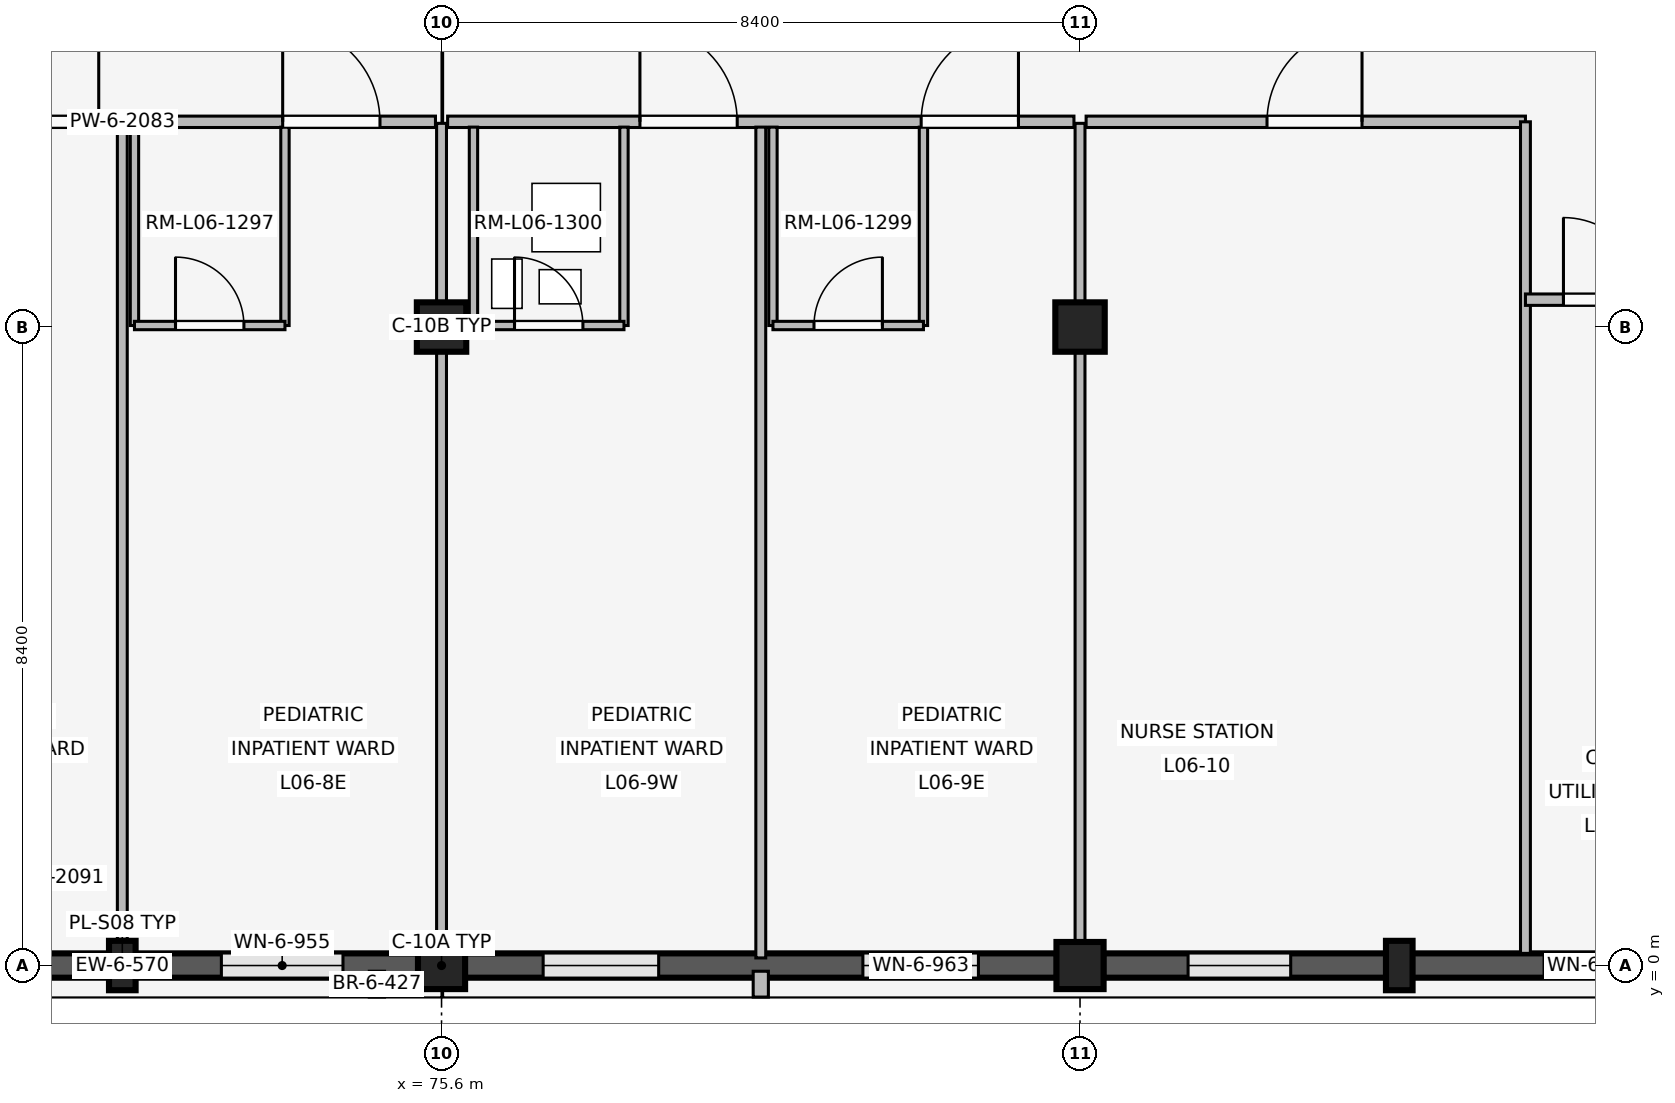
"""IFC4 building model, lengths in metres.
Left out: names, types, materials, properties, quantities, classifications, styles, units other than length and angle.
Written with IfcOpenShell. Run it as: python <this file> out.ifc"""

import sys

from ifc_helpers import new_model, si_unit, direction, frame, frame_2d, origin, origin_2d, place, context, subcontext, project, spatial, rectangle, extrude, element, fill, save


model = new_model("IFC4")
c1 = context("Model", 3, precision=1e-05, world=origin(), true_north=direction((0.0, 1.0)))
c2 = subcontext(c1, "Body", "Model", "MODEL_VIEW")
j1 = project(units=[si_unit("LENGTHUNIT", "METRE"), si_unit("PLANEANGLEUNIT", "RADIAN")], contexts=[c1])
p1 = place(None, origin())
s1 = spatial("IfcSite", under=j1, at=p1, CompositionType="ELEMENT")
p2 = place(p1, origin())
s2 = spatial("IfcBuilding", under=s1, at=p2, CompositionType="ELEMENT")
p3 = place(p2, frame((0.0, 0.0, 24.6)))
s3 = spatial("IfcBuildingStorey", under=s2, at=p3, CompositionType="ELEMENT", Elevation=24.6)
p4 = place(p3, frame((75.6, 0.0, 0.0), z_axis=(0.0, 0.0, 1.0), x_axis=(1.0, 0.0, 0.0)))
e1 = element("IfcColumn", 1, at=p4, inside=s3, PredefinedType="COLUMN", context=c2, shape_type="SweptSolid", body=[
    extrude(rectangle(XDim=0.62, YDim=0.62, at=origin_2d()), origin(), (0.0, 0.0, 1.0), 4.2),
])
p5 = place(p3, frame((75.6, 8.4, 0.0), z_axis=(0.0, 0.0, 1.0), x_axis=(1.0, 0.0, 0.0)))
e2 = element("IfcColumn", 2, at=p5, inside=s3, PredefinedType="COLUMN", context=c2, shape_type="SweptSolid", body=[
    extrude(rectangle(XDim=0.65, YDim=0.65, at=origin_2d()), origin(), (0.0, 0.0, 1.0), 4.2),
])
p6 = place(p3, frame((84.0, 0.0, 0.0), z_axis=(0.0, 0.0, 1.0), x_axis=(1.0, 0.0, 0.0)))
e3 = element("IfcColumn", 3, at=p6, inside=s3, PredefinedType="COLUMN", context=c2, shape_type="SweptSolid", body=[
    extrude(rectangle(XDim=0.62, YDim=0.62, at=origin_2d()), origin(), (0.0, 0.0, 1.0), 4.2),
])
p7 = place(p3, frame((84.0, 8.4, 0.0), z_axis=(0.0, 0.0, 1.0), x_axis=(1.0, 0.0, 0.0)))
e4 = element("IfcColumn", 4, at=p7, inside=s3, PredefinedType="COLUMN", context=c2, shape_type="SweptSolid", body=[
    extrude(rectangle(XDim=0.65, YDim=0.65, at=origin_2d()), origin(), (0.0, 0.0, 1.0), 4.2),
])
for number, where, z_axis, x_axis in (
    (5, (71.4, 0.0, 0.0), (0.0, 0.0, 1.0), (1.0, 0.0, 0.0)),
    (6, (88.2, 0.0, 0.0), (0.0, 0.0, 1.0), (1.0, 0.0, 0.0)),
):
    element("IfcColumn", number, at=place(p3, frame(where, z_axis=z_axis, x_axis=x_axis)), inside=s3, PredefinedType="PILASTER", context=c2, shape_type="SweptSolid", body=[
        extrude(rectangle(XDim=0.35, YDim=0.65, at=origin_2d()), origin(), (0.0, 0.0, 1.0), 4.2),
    ])
p8 = place(p3, frame((75.295, 0.0, 0.0), z_axis=(0.0, 0.0, 1.0), x_axis=(-1.0, 0.0, 0.0)))
e7 = element("IfcWall", 7, at=p8, inside=s3, PredefinedType="SOLIDWALL", context=c2, shape_type="SweptSolid", body=[
    extrude(rectangle(XDim=7.79, YDim=0.32, at=frame_2d((3.895, 0.0))), origin(), (0.0, 0.0, 1.0), 3.34),
])
p9 = place(p8, frame((0.992, 0.0, 0.85)))
e8 = element("IfcOpeningElement", 8, at=p9, cuts=e7, PredefinedType="OPENING", context=c2, shape_type="SweptSolid", body=[
    extrude(rectangle(XDim=1.6, YDim=1.65, at=frame_2d((0.8, 0.825))), frame((0.0, 0.17, 0.0), z_axis=(0.0, -1.0, 0.0), x_axis=(1.0, 0.0, 0.0)), (0.0, 0.0, 1.0), 0.34),
])
p10 = place(p8, frame((5.198, 0.0, 0.85)))
e9 = element("IfcOpeningElement", 9, at=p10, cuts=e7, PredefinedType="OPENING", context=c2, shape_type="SweptSolid", body=[
    extrude(rectangle(XDim=1.6, YDim=1.65, at=frame_2d((0.8, 0.825))), frame((0.0, 0.17, 0.0), z_axis=(0.0, -1.0, 0.0), x_axis=(1.0, 0.0, 0.0)), (0.0, 0.0, 1.0), 0.34),
])
p11 = place(p3, frame((74.75, -0.075, 0.0), z_axis=(0.0, 0.0, 1.0), x_axis=(0.0, -1.0, 0.0)))
e10 = element("IfcWall", 10, at=p11, inside=s3, PredefinedType="ELEMENTEDWALL", context=c2, shape_type="SweptSolid", body=[
    extrude(rectangle(XDim=0.34, YDim=0.2, at=frame_2d((0.17, 0.0))), origin(), (0.0, 0.0, 1.0), 3.32),
])
p12 = place(p3, frame((83.695, 0.0, 0.0), z_axis=(0.0, 0.0, 1.0), x_axis=(-1.0, 0.0, 0.0)))
e11 = element("IfcWall", 11, at=p12, inside=s3, PredefinedType="SOLIDWALL", context=c2, shape_type="SweptSolid", body=[
    extrude(rectangle(XDim=7.79, YDim=0.32, at=frame_2d((3.895, 0.0))), origin(), (0.0, 0.0, 1.0), 3.34),
])
p13 = place(p12, frame((1.032, 0.0, 0.85)))
e12 = element("IfcOpeningElement", 12, at=p13, cuts=e11, PredefinedType="OPENING", context=c2, shape_type="SweptSolid", body=[
    extrude(rectangle(XDim=1.52, YDim=1.65, at=frame_2d((0.76, 0.825))), frame((0.0, 0.17, 0.0), z_axis=(0.0, -1.0, 0.0), x_axis=(1.0, 0.0, 0.0)), (0.0, 0.0, 1.0), 0.34),
])
p14 = place(p12, frame((5.238, 0.0, 0.85)))
e13 = element("IfcOpeningElement", 13, at=p14, cuts=e11, PredefinedType="OPENING", context=c2, shape_type="SweptSolid", body=[
    extrude(rectangle(XDim=1.52, YDim=1.65, at=frame_2d((0.76, 0.825))), frame((0.0, 0.17, 0.0), z_axis=(0.0, -1.0, 0.0), x_axis=(1.0, 0.0, 0.0)), (0.0, 0.0, 1.0), 0.34),
])
p15 = place(p3, frame((79.8, -0.075, 0.0), z_axis=(0.0, 0.0, 1.0), x_axis=(0.0, -1.0, 0.0)))
e14 = element("IfcWall", 14, at=p15, inside=s3, PredefinedType="ELEMENTEDWALL", context=c2, shape_type="SweptSolid", body=[
    extrude(rectangle(XDim=0.34, YDim=0.2, at=frame_2d((0.17, 0.0))), origin(), (0.0, 0.0, 1.0), 3.32),
])
p16 = place(p3, frame((92.095, 0.0, 0.0), z_axis=(0.0, 0.0, 1.0), x_axis=(-1.0, 0.0, 0.0)))
e15 = element("IfcWall", 15, at=p16, inside=s3, PredefinedType="SOLIDWALL", context=c2, shape_type="SweptSolid", body=[
    extrude(rectangle(XDim=7.79, YDim=0.32, at=frame_2d((3.895, 0.0))), origin(), (0.0, 0.0, 1.0), 3.34),
])
p17 = place(p16, frame((0.64, 0.0, 0.85)))
e16 = element("IfcOpeningElement", 16, at=p17, cuts=e15, PredefinedType="OPENING", context=c2, shape_type="SweptSolid", body=[
    extrude(rectangle(XDim=1.35, YDim=1.55, at=frame_2d((0.675, 0.775))), frame((0.0, 0.17, 0.0), z_axis=(0.0, -1.0, 0.0), x_axis=(1.0, 0.0, 0.0)), (0.0, 0.0, 1.0), 0.34),
])
p18 = place(p16, frame((5.323, 0.0, 0.85)))
e17 = element("IfcOpeningElement", 17, at=p18, cuts=e15, PredefinedType="OPENING", context=c2, shape_type="SweptSolid", body=[
    extrude(rectangle(XDim=1.35, YDim=1.55, at=frame_2d((0.675, 0.775))), frame((0.0, 0.17, 0.0), z_axis=(0.0, -1.0, 0.0), x_axis=(1.0, 0.0, 0.0)), (0.0, 0.0, 1.0), 0.34),
])
p19 = place(p3, frame((67.28, 11.1, 0.0), z_axis=(0.0, 0.0, 1.0), x_axis=(1.0, 0.0, 0.0)))
e18 = element("IfcWall", 18, at=p19, inside=s3, PredefinedType="PARTITIONING", context=c2, shape_type="SweptSolid", body=[
    extrude(rectangle(XDim=8.24, YDim=0.15, at=frame_2d((4.12, 0.0))), origin(), (0.0, 0.0, 1.0), 3.32),
])
p20 = place(p19, frame((2.53, 0.0, 0.0)))
e19 = element("IfcOpeningElement", 19, at=p20, cuts=e18, PredefinedType="OPENING", context=c2, shape_type="SweptSolid", body=[
    extrude(rectangle(XDim=1.28, YDim=2.2, at=frame_2d((0.64, 1.1))), frame((0.0, 0.085, 0.0), z_axis=(0.0, -1.0, 0.0), x_axis=(1.0, 0.0, 0.0)), (0.0, 0.0, 1.0), 0.17),
])
p21 = place(p19, frame((6.23, 0.0, 0.0)))
e20 = element("IfcOpeningElement", 20, at=p21, cuts=e18, PredefinedType="OPENING", context=c2, shape_type="SweptSolid", body=[
    extrude(rectangle(XDim=1.28, YDim=2.2, at=frame_2d((0.64, 1.1))), frame((0.0, 0.085, 0.0), z_axis=(0.0, -1.0, 0.0), x_axis=(1.0, 0.0, 0.0)), (0.0, 0.0, 1.0), 0.17),
])
p22 = place(p3, frame((71.4, 0.1, 0.0), z_axis=(0.0, 0.0, 1.0), x_axis=(0.0, 1.0, 0.0)))
e21 = element("IfcWall", 21, at=p22, inside=s3, PredefinedType="PARTITIONING", context=c2, shape_type="SweptSolid", body=[
    extrude(rectangle(XDim=10.93, YDim=0.13, at=frame_2d((5.465, 0.0))), origin(), (0.0, 0.0, 1.0), 3.32),
])
for number, where, z_axis, x_axis in (
    (22, (71.56, 8.42, 0.0), (0.0, 0.0, 1.0), (0.0, 1.0, 0.0)),
    (23, (73.54, 8.42, 0.0), (0.0, 0.0, 1.0), (0.0, 1.0, 0.0)),
):
    element("IfcWall", number, at=place(p3, frame(where, z_axis=z_axis, x_axis=x_axis)), inside=s3, PredefinedType="PARTITIONING", context=c2, shape_type="SweptSolid", body=[
        extrude(rectangle(XDim=2.61, YDim=0.11, at=frame_2d((1.305, 0.0))), origin(), (0.0, 0.0, 1.0), 3.32),
    ])
p23 = place(p3, frame((71.56, 8.42, 0.0), z_axis=(0.0, 0.0, 1.0), x_axis=(1.0, 0.0, 0.0)))
e24 = element("IfcWall", 24, at=p23, inside=s3, PredefinedType="PARTITIONING", context=c2, shape_type="SweptSolid", body=[
    extrude(rectangle(XDim=1.98, YDim=0.11, at=frame_2d((0.99, 0.0))), origin(), (0.0, 0.0, 1.0), 3.32),
])
p24 = place(p23, frame((0.54, 0.0, 0.0)))
e25 = element("IfcOpeningElement", 25, at=p24, cuts=e24, PredefinedType="OPENING", context=c2, shape_type="SweptSolid", body=[
    extrude(rectangle(XDim=0.9, YDim=2.1, at=frame_2d((0.45, 1.05))), frame((0.0, 0.065, 0.0), z_axis=(0.0, -1.0, 0.0), x_axis=(1.0, 0.0, 0.0)), (0.0, 0.0, 1.0), 0.13),
])
p25 = place(p3, frame((70.05, 1.15, 0.0), z_axis=(0.0, 0.0, 1.0), x_axis=(1.0, 0.0, 0.0)))
e26 = element("IfcWall", 26, at=p25, inside=s3, PredefinedType="PLUMBINGWALL", context=c2, shape_type="SweptSolid", body=[
    extrude(rectangle(XDim=0.9, YDim=0.24, at=frame_2d((0.45, 0.0))), origin(), (0.0, 0.0, 1.0), 3.32),
])
p26 = place(p3, frame((75.6, 0.14, 0.0), z_axis=(0.0, 0.0, 1.0), x_axis=(0.0, 1.0, 0.0)))
e27 = element("IfcWall", 27, at=p26, inside=s3, PredefinedType="PARTITIONING", context=c2, shape_type="SweptSolid", body=[
    extrude(rectangle(XDim=10.94, YDim=0.13, at=frame_2d((5.47, 0.0))), origin(), (0.0, 0.0, 1.0), 3.32),
])
p27 = place(p3, frame((75.68, 11.1, 0.0), z_axis=(0.0, 0.0, 1.0), x_axis=(1.0, 0.0, 0.0)))
e28 = element("IfcWall", 28, at=p27, inside=s3, PredefinedType="PARTITIONING", context=c2, shape_type="SweptSolid", body=[
    extrude(rectangle(XDim=8.24, YDim=0.15, at=frame_2d((4.12, 0.0))), origin(), (0.0, 0.0, 1.0), 3.32),
])
p28 = place(p27, frame((2.53, 0.0, 0.0)))
e29 = element("IfcOpeningElement", 29, at=p28, cuts=e28, PredefinedType="OPENING", context=c2, shape_type="SweptSolid", body=[
    extrude(rectangle(XDim=1.28, YDim=2.2, at=frame_2d((0.64, 1.1))), frame((0.0, 0.085, 0.0), z_axis=(0.0, -1.0, 0.0), x_axis=(1.0, 0.0, 0.0)), (0.0, 0.0, 1.0), 0.17),
])
p29 = place(p27, frame((6.23, 0.0, 0.0)))
e30 = element("IfcOpeningElement", 30, at=p29, cuts=e28, PredefinedType="OPENING", context=c2, shape_type="SweptSolid", body=[
    extrude(rectangle(XDim=1.28, YDim=2.2, at=frame_2d((0.64, 1.1))), frame((0.0, 0.085, 0.0), z_axis=(0.0, -1.0, 0.0), x_axis=(1.0, 0.0, 0.0)), (0.0, 0.0, 1.0), 0.17),
])
p30 = place(p3, frame((79.8, 0.1, 0.0), z_axis=(0.0, 0.0, 1.0), x_axis=(0.0, 1.0, 0.0)))
e31 = element("IfcWall", 31, at=p30, inside=s3, PredefinedType="PARTITIONING", context=c2, shape_type="SweptSolid", body=[
    extrude(rectangle(XDim=10.93, YDim=0.13, at=frame_2d((5.465, 0.0))), origin(), (0.0, 0.0, 1.0), 3.32),
])
for number, where, z_axis, x_axis in (
    (32, (76.02, 8.42, 0.0), (0.0, 0.0, 1.0), (0.0, 1.0, 0.0)),
    (33, (78.0, 8.42, 0.0), (0.0, 0.0, 1.0), (0.0, 1.0, 0.0)),
):
    element("IfcWall", number, at=place(p3, frame(where, z_axis=z_axis, x_axis=x_axis)), inside=s3, PredefinedType="PARTITIONING", context=c2, shape_type="SweptSolid", body=[
        extrude(rectangle(XDim=2.61, YDim=0.11, at=frame_2d((1.305, 0.0))), origin(), (0.0, 0.0, 1.0), 3.32),
    ])
p31 = place(p3, frame((76.02, 8.42, 0.0), z_axis=(0.0, 0.0, 1.0), x_axis=(1.0, 0.0, 0.0)))
e34 = element("IfcWall", 34, at=p31, inside=s3, PredefinedType="PARTITIONING", context=c2, shape_type="SweptSolid", body=[
    extrude(rectangle(XDim=1.98, YDim=0.11, at=frame_2d((0.99, 0.0))), origin(), (0.0, 0.0, 1.0), 3.32),
])
p32 = place(p31, frame((0.54, 0.0, 0.0)))
e35 = element("IfcOpeningElement", 35, at=p32, cuts=e34, PredefinedType="OPENING", context=c2, shape_type="SweptSolid", body=[
    extrude(rectangle(XDim=0.9, YDim=2.1, at=frame_2d((0.45, 1.05))), frame((0.0, 0.065, 0.0), z_axis=(0.0, -1.0, 0.0), x_axis=(1.0, 0.0, 0.0)), (0.0, 0.0, 1.0), 0.13),
])
for number, where, z_axis, x_axis in (
    (36, (79.96, 8.42, 0.0), (0.0, 0.0, 1.0), (0.0, 1.0, 0.0)),
    (37, (81.94, 8.42, 0.0), (0.0, 0.0, 1.0), (0.0, 1.0, 0.0)),
):
    element("IfcWall", number, at=place(p3, frame(where, z_axis=z_axis, x_axis=x_axis)), inside=s3, PredefinedType="PARTITIONING", context=c2, shape_type="SweptSolid", body=[
        extrude(rectangle(XDim=2.61, YDim=0.11, at=frame_2d((1.305, 0.0))), origin(), (0.0, 0.0, 1.0), 3.32),
    ])
p33 = place(p3, frame((79.96, 8.42, 0.0), z_axis=(0.0, 0.0, 1.0), x_axis=(1.0, 0.0, 0.0)))
e38 = element("IfcWall", 38, at=p33, inside=s3, PredefinedType="PARTITIONING", context=c2, shape_type="SweptSolid", body=[
    extrude(rectangle(XDim=1.98, YDim=0.11, at=frame_2d((0.99, 0.0))), origin(), (0.0, 0.0, 1.0), 3.32),
])
p34 = place(p33, frame((0.54, 0.0, 0.0)))
e39 = element("IfcOpeningElement", 39, at=p34, cuts=e38, PredefinedType="OPENING", context=c2, shape_type="SweptSolid", body=[
    extrude(rectangle(XDim=0.9, YDim=2.1, at=frame_2d((0.45, 1.05))), frame((0.0, 0.065, 0.0), z_axis=(0.0, -1.0, 0.0), x_axis=(1.0, 0.0, 0.0)), (0.0, 0.0, 1.0), 0.13),
])
p35 = place(p3, frame((84.0, 0.14, 0.0), z_axis=(0.0, 0.0, 1.0), x_axis=(0.0, 1.0, 0.0)))
e40 = element("IfcWall", 40, at=p35, inside=s3, PredefinedType="PARTITIONING", context=c2, shape_type="SweptSolid", body=[
    extrude(rectangle(XDim=10.94, YDim=0.13, at=frame_2d((5.47, 0.0))), origin(), (0.0, 0.0, 1.0), 3.32),
])
p36 = place(p3, frame((84.08, 11.1, 0.0), z_axis=(0.0, 0.0, 1.0), x_axis=(1.0, 0.0, 0.0)))
e41 = element("IfcWall", 41, at=p36, inside=s3, PredefinedType="PARTITIONING", context=c2, shape_type="SweptSolid", body=[
    extrude(rectangle(XDim=5.78, YDim=0.15, at=frame_2d((2.89, 0.0))), origin(), (0.0, 0.0, 1.0), 3.32),
])
p37 = place(p36, frame((2.38, 0.0, 0.0)))
e42 = element("IfcOpeningElement", 42, at=p37, cuts=e41, PredefinedType="OPENING", context=c2, shape_type="SweptSolid", body=[
    extrude(rectangle(XDim=1.25, YDim=2.2, at=frame_2d((0.625, 1.1))), frame((0.0, 0.085, 0.0), z_axis=(0.0, -1.0, 0.0), x_axis=(1.0, 0.0, 0.0)), (0.0, 0.0, 1.0), 0.17),
])
p38 = place(p3, frame((89.86, 0.16, 0.0), z_axis=(0.0, 0.0, 1.0), x_axis=(0.0, 1.0, 0.0)))
e43 = element("IfcWall", 43, at=p38, inside=s3, PredefinedType="PARTITIONING", context=c2, shape_type="SweptSolid", body=[
    extrude(rectangle(XDim=10.94, YDim=0.13, at=frame_2d((5.47, 0.0))), origin(), (0.0, 0.0, 1.0), 3.32),
])
p39 = place(p3, frame((89.86, 8.76, 0.0), z_axis=(0.0, 0.0, 1.0), x_axis=(1.0, 0.0, 0.0)))
e44 = element("IfcWall", 44, at=p39, inside=s3, PredefinedType="PARTITIONING", context=c2, shape_type="SweptSolid", body=[
    extrude(rectangle(XDim=2.18, YDim=0.15, at=frame_2d((1.09, 0.0))), origin(), (0.0, 0.0, 1.0), 3.32),
])
p40 = place(p39, frame((0.5, 0.0, 0.0)))
e45 = element("IfcOpeningElement", 45, at=p40, cuts=e44, PredefinedType="OPENING", context=c2, shape_type="SweptSolid", body=[
    extrude(rectangle(XDim=1.08, YDim=2.15, at=frame_2d((0.54, 1.075))), frame((0.0, 0.085, 0.0), z_axis=(0.0, -1.0, 0.0), x_axis=(1.0, 0.0, 0.0)), (0.0, 0.0, 1.0), 0.17),
])
p41 = place(p9, origin())
e46 = element("IfcWindow", 46, at=p41, inside=s3, PartitioningType="SINGLE_PANEL", PredefinedType="WINDOW", context=c2, shape_type="SweptSolid", body=[
    extrude(rectangle(XDim=1.6, YDim=1.65, at=frame_2d((0.8, 0.825))), frame((0.0, 0.03, 0.0), z_axis=(0.0, -1.0, 0.0), x_axis=(1.0, 0.0, 0.0)), (0.0, 0.0, 1.0), 0.06),
])
fill(e8, e46)
p42 = place(p13, origin())
e47 = element("IfcWindow", 47, at=p42, inside=s3, PartitioningType="SINGLE_PANEL", PredefinedType="WINDOW", context=c2, shape_type="SweptSolid", body=[
    extrude(rectangle(XDim=1.52, YDim=1.65, at=frame_2d((0.76, 0.825))), frame((0.0, 0.03, 0.0), z_axis=(0.0, -1.0, 0.0), x_axis=(1.0, 0.0, 0.0)), (0.0, 0.0, 1.0), 0.06),
])
fill(e12, e47)
p43 = place(p14, origin())
e48 = element("IfcWindow", 48, at=p43, inside=s3, PartitioningType="SINGLE_PANEL", PredefinedType="WINDOW", context=c2, shape_type="SweptSolid", body=[
    extrude(rectangle(XDim=1.52, YDim=1.65, at=frame_2d((0.76, 0.825))), frame((0.0, 0.03, 0.0), z_axis=(0.0, -1.0, 0.0), x_axis=(1.0, 0.0, 0.0)), (0.0, 0.0, 1.0), 0.06),
])
fill(e13, e48)
p44 = place(p17, origin())
e49 = element("IfcWindow", 49, at=p44, inside=s3, PartitioningType="SINGLE_PANEL", PredefinedType="WINDOW", context=c2, shape_type="SweptSolid", body=[
    extrude(rectangle(XDim=1.35, YDim=1.55, at=frame_2d((0.675, 0.775))), frame((0.0, 0.03, 0.0), z_axis=(0.0, -1.0, 0.0), x_axis=(1.0, 0.0, 0.0)), (0.0, 0.0, 1.0), 0.06),
])
fill(e16, e49)
p45 = place(p18, origin())
e50 = element("IfcWindow", 50, at=p45, inside=s3, PartitioningType="SINGLE_PANEL", PredefinedType="WINDOW", context=c2, shape_type="SweptSolid", body=[
    extrude(rectangle(XDim=1.35, YDim=1.55, at=frame_2d((0.675, 0.775))), frame((0.0, 0.03, 0.0), z_axis=(0.0, -1.0, 0.0), x_axis=(1.0, 0.0, 0.0)), (0.0, 0.0, 1.0), 0.06),
])
fill(e17, e50)
p46 = place(p20, origin())
e51 = element("IfcDoor", 51, at=p46, inside=s3, OperationType="SINGLE_SWING_RIGHT", PredefinedType="DOOR", context=c2, shape_type="SweptSolid", body=[
    extrude(rectangle(XDim=1.28, YDim=2.2, at=frame_2d((0.64, 1.1))), frame((0.0, 0.025, 0.0), z_axis=(0.0, -1.0, 0.0), x_axis=(1.0, 0.0, 0.0)), (0.0, 0.0, 1.0), 0.05),
])
fill(e19, e51)
p47 = place(p21, origin())
e52 = element("IfcDoor", 52, at=p47, inside=s3, OperationType="SINGLE_SWING_LEFT", PredefinedType="DOOR", context=c2, shape_type="SweptSolid", body=[
    extrude(rectangle(XDim=1.28, YDim=2.2, at=frame_2d((0.64, 1.1))), frame((0.0, 0.025, 0.0), z_axis=(0.0, -1.0, 0.0), x_axis=(1.0, 0.0, 0.0)), (0.0, 0.0, 1.0), 0.05),
])
fill(e20, e52)
p48 = place(p24, origin())
e53 = element("IfcDoor", 53, at=p48, inside=s3, OperationType="SINGLE_SWING_LEFT", PredefinedType="DOOR", context=c2, shape_type="SweptSolid", body=[
    extrude(rectangle(XDim=0.9, YDim=2.1, at=frame_2d((0.45, 1.05))), frame((0.0, 0.025, 0.0), z_axis=(0.0, -1.0, 0.0), x_axis=(1.0, 0.0, 0.0)), (0.0, 0.0, 1.0), 0.05),
])
fill(e25, e53)
p49 = place(p28, origin())
e54 = element("IfcDoor", 54, at=p49, inside=s3, OperationType="SINGLE_SWING_LEFT", PredefinedType="DOOR", context=c2, shape_type="SweptSolid", body=[
    extrude(rectangle(XDim=1.28, YDim=2.2, at=frame_2d((0.64, 1.1))), frame((0.0, 0.025, 0.0), z_axis=(0.0, -1.0, 0.0), x_axis=(1.0, 0.0, 0.0)), (0.0, 0.0, 1.0), 0.05),
])
fill(e29, e54)
p50 = place(p29, origin())
e55 = element("IfcDoor", 55, at=p50, inside=s3, OperationType="SINGLE_SWING_RIGHT", PredefinedType="DOOR", context=c2, shape_type="SweptSolid", body=[
    extrude(rectangle(XDim=1.28, YDim=2.2, at=frame_2d((0.64, 1.1))), frame((0.0, 0.025, 0.0), z_axis=(0.0, -1.0, 0.0), x_axis=(1.0, 0.0, 0.0)), (0.0, 0.0, 1.0), 0.05),
])
fill(e30, e55)
p51 = place(p32, origin())
e56 = element("IfcDoor", 56, at=p51, inside=s3, OperationType="SINGLE_SWING_LEFT", PredefinedType="DOOR", context=c2, shape_type="SweptSolid", body=[
    extrude(rectangle(XDim=0.9, YDim=2.1, at=frame_2d((0.45, 1.05))), frame((0.0, 0.025, 0.0), z_axis=(0.0, -1.0, 0.0), x_axis=(1.0, 0.0, 0.0)), (0.0, 0.0, 1.0), 0.05),
])
fill(e35, e56)
p52 = place(p34, origin())
e57 = element("IfcDoor", 57, at=p52, inside=s3, OperationType="SINGLE_SWING_RIGHT", PredefinedType="DOOR", context=c2, shape_type="SweptSolid", body=[
    extrude(rectangle(XDim=0.9, YDim=2.1, at=frame_2d((0.45, 1.05))), frame((0.0, 0.025, 0.0), z_axis=(0.0, -1.0, 0.0), x_axis=(1.0, 0.0, 0.0)), (0.0, 0.0, 1.0), 0.05),
])
fill(e39, e57)
p53 = place(p37, origin())
e58 = element("IfcDoor", 58, at=p53, inside=s3, OperationType="SINGLE_SWING_RIGHT", PredefinedType="DOOR", context=c2, shape_type="SweptSolid", body=[
    extrude(rectangle(XDim=1.25, YDim=2.2, at=frame_2d((0.625, 1.1))), frame((0.0, 0.025, 0.0), z_axis=(0.0, -1.0, 0.0), x_axis=(1.0, 0.0, 0.0)), (0.0, 0.0, 1.0), 0.05),
])
fill(e42, e58)
p54 = place(p40, origin())
e59 = element("IfcDoor", 59, at=p54, inside=s3, OperationType="SINGLE_SWING_LEFT", PredefinedType="DOOR", context=c2, shape_type="SweptSolid", body=[
    extrude(rectangle(XDim=1.08, YDim=2.15, at=frame_2d((0.54, 1.075))), frame((0.0, 0.025, 0.0), z_axis=(0.0, -1.0, 0.0), x_axis=(1.0, 0.0, 0.0)), (0.0, 0.0, 1.0), 0.05),
])
fill(e45, e59)
save(model, sys.argv[1])
